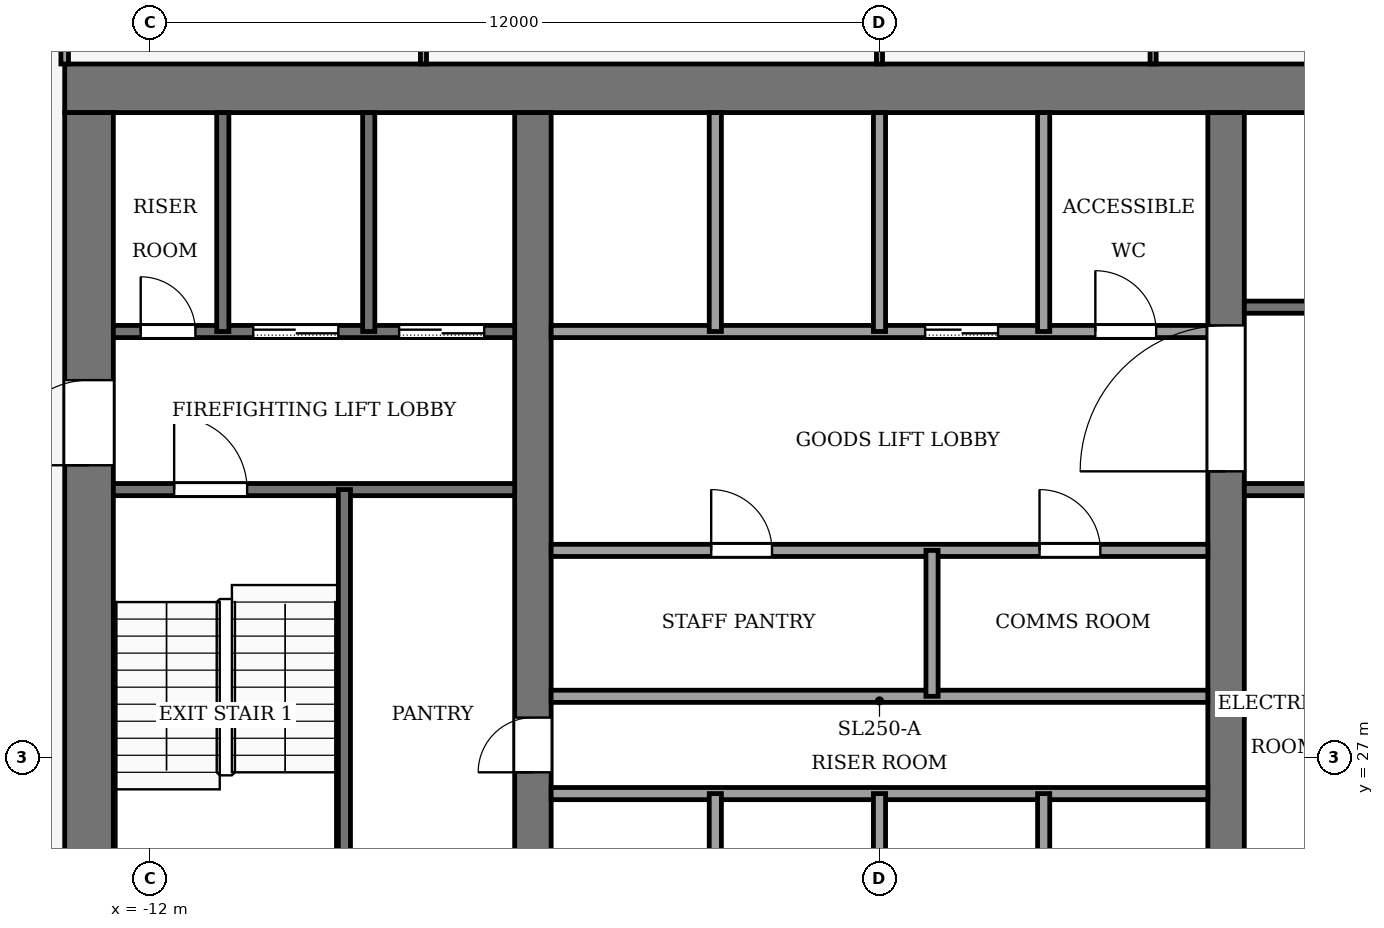
"""IFC4 building model, lengths in metres.
Left out: names, types, materials, properties, quantities, classifications, styles, units other than length and angle.
Written with IfcOpenShell. Run it as: python <this file> out.ifc"""

import sys

from ifc_helpers import new_model, si_unit, direction, frame, frame_2d, origin, place, context, subcontext, project, spatial, rectangle, extrude, element, fill, save


model = new_model("IFC4")
c1 = context("Model", 3, precision=1e-05, world=origin(), true_north=direction((0.0, 1.0)))
c2 = subcontext(c1, "Body", "Model", "MODEL_VIEW")
j1 = project(units=[si_unit("LENGTHUNIT", "METRE"), si_unit("PLANEANGLEUNIT", "RADIAN")], contexts=[c1])
p1 = place(None, origin())
s1 = spatial("IfcSite", under=j1, at=p1, CompositionType="ELEMENT")
p2 = place(p1, origin())
s2 = spatial("IfcBuilding", under=s1, at=p2, CompositionType="ELEMENT")
p3 = place(p2, frame((0.0, 0.0, 266.0)))
s3 = spatial("IfcBuildingStorey", under=s2, at=p3, CompositionType="ELEMENT", Elevation=266.0)
p4 = place(p3, frame((-13.4, 38.0, -0.13), z_axis=(0.0, 0.0, 1.0), x_axis=(1.0, 0.0, 0.0)))
e1 = element("IfcWall", 1, at=p4, inside=s3, PredefinedType="SHEAR", context=c2, shape_type="SweptSolid", body=[
    extrude(rectangle(XDim=26.8, YDim=0.8, at=frame_2d((13.4, 0.0))), origin(), (0.0, 0.0, 1.0), 4.0),
])
p5 = place(p3, frame((-13.0, 18.4, -0.13), z_axis=(0.0, 0.0, 1.0), x_axis=(0.0, 1.0, 0.0)))
e2 = element("IfcWall", 2, at=p5, inside=s3, PredefinedType="SHEAR", context=c2, shape_type="SweptSolid", body=[
    extrude(rectangle(XDim=19.2, YDim=0.8, at=frame_2d((9.6, 0.0))), origin(), (0.0, 0.0, 1.0), 4.0),
])
p6 = place(p5, frame((2.8, 0.0, 0.13)))
e3 = element("IfcOpeningElement", 3, at=p6, cuts=e2, PredefinedType="OPENING", context=c2, shape_type="SweptSolid", body=[
    extrude(rectangle(XDim=2.4, YDim=2.4, at=frame_2d((1.2, 1.2))), frame((0.0, 0.41, 0.0), z_axis=(0.0, -1.0, 0.0), x_axis=(1.0, 0.0, 0.0)), (0.0, 0.0, 1.0), 0.82),
])
p7 = place(p5, frame((13.4, 0.0, 0.13)))
e4 = element("IfcOpeningElement", 4, at=p7, cuts=e2, PredefinedType="OPENING", context=c2, shape_type="SweptSolid", body=[
    extrude(rectangle(XDim=1.4, YDim=2.2, at=frame_2d((0.7, 1.1))), frame((0.0, 0.41, 0.0), z_axis=(0.0, -1.0, 0.0), x_axis=(1.0, 0.0, 0.0)), (0.0, 0.0, 1.0), 0.82),
])
p8 = place(p3, frame((-5.7, 18.4, -0.13), z_axis=(0.0, 0.0, 1.0), x_axis=(0.0, 1.0, 0.0)))
e5 = element("IfcWall", 5, at=p8, inside=s3, PredefinedType="SHEAR", context=c2, shape_type="SweptSolid", body=[
    extrude(rectangle(XDim=19.2, YDim=0.6, at=frame_2d((9.6, 0.0))), origin(), (0.0, 0.0, 1.0), 4.0),
])
p9 = place(p8, frame((8.35, 0.0, 0.13)))
e6 = element("IfcOpeningElement", 6, at=p9, cuts=e5, PredefinedType="OPENING", context=c2, shape_type="SweptSolid", body=[
    extrude(rectangle(XDim=0.9, YDim=2.1, at=frame_2d((0.45, 1.05))), frame((0.0, 0.31, 0.0), z_axis=(0.0, -1.0, 0.0), x_axis=(1.0, 0.0, 0.0)), (0.0, 0.0, 1.0), 0.62),
])
p10 = place(p3, frame((5.7, 18.4, -0.13), z_axis=(0.0, 0.0, 1.0), x_axis=(0.0, 1.0, 0.0)))
e7 = element("IfcWall", 7, at=p10, inside=s3, PredefinedType="SHEAR", context=c2, shape_type="SweptSolid", body=[
    extrude(rectangle(XDim=19.2, YDim=0.6, at=frame_2d((9.6, 0.0))), origin(), (0.0, 0.0, 1.0), 4.0),
])
p11 = place(p10, frame((13.3, 0.0, 0.13)))
e8 = element("IfcOpeningElement", 8, at=p11, cuts=e7, PredefinedType="OPENING", context=c2, shape_type="SweptSolid", body=[
    extrude(rectangle(XDim=2.4, YDim=2.4, at=frame_2d((1.2, 1.2))), frame((0.0, 0.31, 0.0), z_axis=(0.0, -1.0, 0.0), x_axis=(1.0, 0.0, 0.0)), (0.0, 0.0, 1.0), 0.62),
])
for number, where, z_axis, x_axis in (
    (9, (-5.4, 26.4, 0.0), (0.0, 0.0, 1.0), (1.0, 0.0, 0.0)),
    (10, (-5.4, 28.0, 0.0), (0.0, 0.0, 1.0), (1.0, 0.0, 0.0)),
):
    element("IfcWall", number, at=place(p3, frame(where, z_axis=z_axis, x_axis=x_axis)), inside=s3, PredefinedType="PARTITIONING", context=c2, shape_type="SweptSolid", body=[
        extrude(rectangle(XDim=10.8, YDim=0.2, at=frame_2d((5.4, 0.0))), origin(), (0.0, 0.0, 1.0), 3.87),
    ])
p12 = place(p3, frame((-5.4, 30.4, 0.0), z_axis=(0.0, 0.0, 1.0), x_axis=(1.0, 0.0, 0.0)))
e11 = element("IfcWall", 11, at=p12, inside=s3, PredefinedType="PARTITIONING", context=c2, shape_type="SweptSolid", body=[
    extrude(rectangle(XDim=10.8, YDim=0.2, at=frame_2d((5.4, 0.0))), origin(), (0.0, 0.0, 1.0), 3.87),
])
p13 = place(p12, frame((2.632, 0.0, 0.0)))
e12 = element("IfcOpeningElement", 12, at=p13, cuts=e11, PredefinedType="OPENING", context=c2, shape_type="SweptSolid", body=[
    extrude(rectangle(XDim=1.0, YDim=2.1, at=frame_2d((0.5, 1.05))), frame((0.0, 0.11, 0.0), z_axis=(0.0, -1.0, 0.0), x_axis=(1.0, 0.0, 0.0)), (0.0, 0.0, 1.0), 0.22),
])
p14 = place(p12, frame((8.032, 0.0, 0.0)))
e13 = element("IfcOpeningElement", 13, at=p14, cuts=e11, PredefinedType="OPENING", context=c2, shape_type="SweptSolid", body=[
    extrude(rectangle(XDim=1.0, YDim=2.1, at=frame_2d((0.5, 1.05))), frame((0.0, 0.11, 0.0), z_axis=(0.0, -1.0, 0.0), x_axis=(1.0, 0.0, 0.0)), (0.0, 0.0, 1.0), 0.22),
])
p15 = place(p3, frame((-12.6, 31.4, 0.0), z_axis=(0.0, 0.0, 1.0), x_axis=(1.0, 0.0, 0.0)))
e14 = element("IfcWall", 14, at=p15, inside=s3, PredefinedType="PARTITIONING", context=c2, shape_type="SweptSolid", body=[
    extrude(rectangle(XDim=6.6, YDim=0.2, at=frame_2d((3.3, 0.0))), origin(), (0.0, 0.0, 1.0), 3.87),
])
p16 = place(p15, frame((1.0, 0.0, 0.0)))
e15 = element("IfcOpeningElement", 15, at=p16, cuts=e14, PredefinedType="OPENING", context=c2, shape_type="SweptSolid", body=[
    extrude(rectangle(XDim=1.2, YDim=2.2, at=frame_2d((0.6, 1.1))), frame((0.0, 0.11, 0.0), z_axis=(0.0, -1.0, 0.0), x_axis=(1.0, 0.0, 0.0)), (0.0, 0.0, 1.0), 0.22),
])
p17 = place(p3, frame((6.0, 31.4, 0.0), z_axis=(0.0, 0.0, 1.0), x_axis=(1.0, 0.0, 0.0)))
e16 = element("IfcWall", 16, at=p17, inside=s3, PredefinedType="PARTITIONING", context=c2, shape_type="SweptSolid", body=[
    extrude(rectangle(XDim=6.6, YDim=0.2, at=frame_2d((3.3, 0.0))), origin(), (0.0, 0.0, 1.0), 3.87),
])
p18 = place(p3, frame((-12.6, 34.0, 0.0), z_axis=(0.0, 0.0, 1.0), x_axis=(1.0, 0.0, 0.0)))
e17 = element("IfcWall", 17, at=p18, inside=s3, PredefinedType="PARTITIONING", context=c2, shape_type="SweptSolid", body=[
    extrude(rectangle(XDim=6.6, YDim=0.2, at=frame_2d((3.3, 0.0))), origin(), (0.0, 0.0, 1.0), 3.87),
])
p19 = place(p18, frame((4.7, 0.0, 0.0)))
e18 = element("IfcOpeningElement", 18, at=p19, cuts=e17, PredefinedType="OPENING", context=c2, shape_type="SweptSolid", body=[
    extrude(rectangle(XDim=1.4, YDim=2.2, at=frame_2d((0.7, 1.1))), frame((0.0, 0.11, 0.0), z_axis=(0.0, -1.0, 0.0), x_axis=(1.0, 0.0, 0.0)), (0.0, 0.0, 1.0), 0.22),
])
p20 = place(p18, frame((2.3, 0.0, 0.0)))
e19 = element("IfcOpeningElement", 19, at=p20, cuts=e17, PredefinedType="OPENING", context=c2, shape_type="SweptSolid", body=[
    extrude(rectangle(XDim=1.4, YDim=2.2, at=frame_2d((0.7, 1.1))), frame((0.0, 0.11, 0.0), z_axis=(0.0, -1.0, 0.0), x_axis=(1.0, 0.0, 0.0)), (0.0, 0.0, 1.0), 0.22),
])
p21 = place(p18, frame((0.45, 0.0, 0.0)))
e20 = element("IfcOpeningElement", 20, at=p21, cuts=e17, PredefinedType="OPENING", context=c2, shape_type="SweptSolid", body=[
    extrude(rectangle(XDim=0.9, YDim=2.1, at=frame_2d((0.45, 1.05))), frame((0.0, 0.11, 0.0), z_axis=(0.0, -1.0, 0.0), x_axis=(1.0, 0.0, 0.0)), (0.0, 0.0, 1.0), 0.22),
])
p22 = place(p3, frame((-5.4, 34.0, 0.0), z_axis=(0.0, 0.0, 1.0), x_axis=(1.0, 0.0, 0.0)))
e21 = element("IfcWall", 21, at=p22, inside=s3, PredefinedType="PARTITIONING", context=c2, shape_type="SweptSolid", body=[
    extrude(rectangle(XDim=10.8, YDim=0.2, at=frame_2d((5.4, 0.0))), origin(), (0.0, 0.0, 1.0), 3.87),
])
p23 = place(p22, frame((6.15, 0.0, 0.0)))
e22 = element("IfcOpeningElement", 22, at=p23, cuts=e21, PredefinedType="OPENING", context=c2, shape_type="SweptSolid", body=[
    extrude(rectangle(XDim=1.2, YDim=2.2, at=frame_2d((0.6, 1.1))), frame((0.0, 0.11, 0.0), z_axis=(0.0, -1.0, 0.0), x_axis=(1.0, 0.0, 0.0)), (0.0, 0.0, 1.0), 0.22),
])
p24 = place(p22, frame((8.95, 0.0, 0.0)))
e23 = element("IfcOpeningElement", 23, at=p24, cuts=e21, PredefinedType="OPENING", context=c2, shape_type="SweptSolid", body=[
    extrude(rectangle(XDim=1.0, YDim=2.1, at=frame_2d((0.5, 1.05))), frame((0.0, 0.11, 0.0), z_axis=(0.0, -1.0, 0.0), x_axis=(1.0, 0.0, 0.0)), (0.0, 0.0, 1.0), 0.22),
])
p25 = place(p3, frame((6.0, 34.4, 0.0), z_axis=(0.0, 0.0, 1.0), x_axis=(1.0, 0.0, 0.0)))
e24 = element("IfcWall", 24, at=p25, inside=s3, PredefinedType="PARTITIONING", context=c2, shape_type="SweptSolid", body=[
    extrude(rectangle(XDim=6.6, YDim=0.2, at=frame_2d((3.3, 0.0))), origin(), (0.0, 0.0, 1.0), 3.87),
])
p26 = place(p25, frame((4.8, 0.0, 0.0)))
e25 = element("IfcOpeningElement", 25, at=p26, cuts=e24, PredefinedType="OPENING", context=c2, shape_type="SweptSolid", body=[
    extrude(rectangle(XDim=1.2, YDim=2.2, at=frame_2d((0.6, 1.1))), frame((0.0, 0.11, 0.0), z_axis=(0.0, -1.0, 0.0), x_axis=(1.0, 0.0, 0.0)), (0.0, 0.0, 1.0), 0.22),
])
p27 = place(p3, frame((-10.8, 34.0, 0.0), z_axis=(0.0, 0.0, 1.0), x_axis=(0.0, 1.0, 0.0)))
e26 = element("IfcWall", 26, at=p27, inside=s3, PredefinedType="PARTITIONING", context=c2, shape_type="SweptSolid", body=[
    extrude(rectangle(XDim=3.6, YDim=0.2, at=frame_2d((1.8, 0.0))), origin(), (0.0, 0.0, 1.0), 3.87),
])
p28 = place(p3, frame((-8.8, 24.0, 0.0), z_axis=(0.0, 0.0, 1.0), x_axis=(0.0, 1.0, 0.0)))
e27 = element("IfcWall", 27, at=p28, inside=s3, PredefinedType="PARTITIONING", context=c2, shape_type="SweptSolid", body=[
    extrude(rectangle(XDim=7.4, YDim=0.2, at=frame_2d((3.7, 0.0))), origin(), (0.0, 0.0, 1.0), 3.87),
])
p29 = place(p3, frame((-8.4, 34.0, 0.0), z_axis=(0.0, 0.0, 1.0), x_axis=(0.0, 1.0, 0.0)))
e28 = element("IfcWall", 28, at=p29, inside=s3, PredefinedType="PARTITIONING", context=c2, shape_type="SweptSolid", body=[
    extrude(rectangle(XDim=3.6, YDim=0.2, at=frame_2d((1.8, 0.0))), origin(), (0.0, 0.0, 1.0), 3.87),
])
p30 = place(p3, frame((-2.7, 24.0, 0.0), z_axis=(0.0, 0.0, 1.0), x_axis=(0.0, 1.0, 0.0)))
e29 = element("IfcWall", 29, at=p30, inside=s3, PredefinedType="PARTITIONING", context=c2, shape_type="SweptSolid", body=[
    extrude(rectangle(XDim=2.4, YDim=0.2, at=frame_2d((1.2, 0.0))), origin(), (0.0, 0.0, 1.0), 3.87),
])
p31 = place(p3, frame((-2.7, 34.0, 0.0), z_axis=(0.0, 0.0, 1.0), x_axis=(0.0, 1.0, 0.0)))
e30 = element("IfcWall", 30, at=p31, inside=s3, PredefinedType="PARTITIONING", context=c2, shape_type="SweptSolid", body=[
    extrude(rectangle(XDim=3.6, YDim=0.2, at=frame_2d((1.8, 0.0))), origin(), (0.0, 0.0, 1.0), 3.87),
])
p32 = place(p3, frame((0.0, 24.0, 0.0), z_axis=(0.0, 0.0, 1.0), x_axis=(0.0, 1.0, 0.0)))
e31 = element("IfcWall", 31, at=p32, inside=s3, PredefinedType="PARTITIONING", context=c2, shape_type="SweptSolid", body=[
    extrude(rectangle(XDim=2.4, YDim=0.2, at=frame_2d((1.2, 0.0))), origin(), (0.0, 0.0, 1.0), 3.87),
])
p33 = place(p3, frame((0.0, 34.0, 0.0), z_axis=(0.0, 0.0, 1.0), x_axis=(0.0, 1.0, 0.0)))
e32 = element("IfcWall", 32, at=p33, inside=s3, PredefinedType="PARTITIONING", context=c2, shape_type="SweptSolid", body=[
    extrude(rectangle(XDim=3.6, YDim=0.2, at=frame_2d((1.8, 0.0))), origin(), (0.0, 0.0, 1.0), 3.87),
])
for number, where, z_axis, x_axis in (
    (33, (0.864, 28.0, 0.0), (0.0, 0.0, 1.0), (0.0, 1.0, 0.0)),
    (34, (2.7, 24.0, 0.0), (0.0, 0.0, 1.0), (0.0, 1.0, 0.0)),
):
    element("IfcWall", number, at=place(p3, frame(where, z_axis=z_axis, x_axis=x_axis)), inside=s3, PredefinedType="PARTITIONING", context=c2, shape_type="SweptSolid", body=[
        extrude(rectangle(XDim=2.4, YDim=0.2, at=frame_2d((1.2, 0.0))), origin(), (0.0, 0.0, 1.0), 3.87),
    ])
p34 = place(p3, frame((2.7, 34.0, 0.0), z_axis=(0.0, 0.0, 1.0), x_axis=(0.0, 1.0, 0.0)))
e35 = element("IfcWall", 35, at=p34, inside=s3, PredefinedType="PARTITIONING", context=c2, shape_type="SweptSolid", body=[
    extrude(rectangle(XDim=3.6, YDim=0.2, at=frame_2d((1.8, 0.0))), origin(), (0.0, 0.0, 1.0), 3.87),
])
p35 = place(p3, frame((-13.4, 40.5, 0.0), z_axis=(0.0, 0.0, 1.0), x_axis=(0.0, -1.0, 0.0)))
e36 = element("IfcWall", 36, at=p35, inside=s3, PredefinedType="PARTITIONING", context=c2, shape_type="SweptSolid", body=[
    extrude(rectangle(XDim=2.1, YDim=0.125, at=frame_2d((1.05, 0.0))), origin(), (0.0, 0.0, 1.0), 3.14),
])
p36 = place(p35, frame((0.55, 0.0, 0.0)))
e37 = element("IfcOpeningElement", 37, at=p36, cuts=e36, PredefinedType="OPENING", context=c2, shape_type="SweptSolid", body=[
    extrude(rectangle(XDim=1.0, YDim=2.1, at=frame_2d((0.5, 1.05))), frame((0.0, 0.073, 0.0), z_axis=(0.0, -1.0, 0.0), x_axis=(1.0, 0.0, 0.0)), (0.0, 0.0, 1.0), 0.145),
])
p37 = place(p3, frame((-7.5, 38.4, 0.0), z_axis=(0.0, 0.0, 1.0), x_axis=(0.0, 1.0, 0.0)))
e38 = element("IfcWall", 38, at=p37, inside=s3, PredefinedType="PARTITIONING", context=c2, shape_type="SweptSolid", body=[
    extrude(rectangle(XDim=2.104, YDim=0.1, at=frame_2d((1.052, 0.0))), origin(), (0.0, 0.0, 1.0), 3.87),
])
p38 = place(p3, frame((0.0, 38.4, 0.0), z_axis=(0.0, 0.0, 1.0), x_axis=(0.0, 1.0, 0.0)))
e39 = element("IfcWall", 39, at=p38, inside=s3, PredefinedType="PARTITIONING", context=c2, shape_type="SweptSolid", body=[
    extrude(rectangle(XDim=2.1, YDim=0.1, at=frame_2d((1.05, 0.0))), origin(), (0.0, 0.0, 1.0), 3.44),
])
p39 = place(p3, frame((4.5, 38.4, 0.0), z_axis=(0.0, 0.0, 1.0), x_axis=(0.0, 1.0, 0.0)))
e40 = element("IfcWall", 40, at=p39, inside=s3, PredefinedType="PARTITIONING", context=c2, shape_type="SweptSolid", body=[
    extrude(rectangle(XDim=2.1, YDim=0.1, at=frame_2d((1.05, 0.0))), origin(), (0.0, 0.0, 1.0), 3.87),
])
p40 = place(p39, frame((0.55, 0.0, 0.0)))
e41 = element("IfcOpeningElement", 41, at=p40, cuts=e40, PredefinedType="OPENING", context=c2, shape_type="SweptSolid", body=[
    extrude(rectangle(XDim=1.0, YDim=2.1, at=frame_2d((0.5, 1.05))), frame((0.0, 0.06, 0.0), z_axis=(0.0, -1.0, 0.0), x_axis=(1.0, 0.0, 0.0)), (0.0, 0.0, 1.0), 0.12),
])
p41 = place(p23, origin())
e42 = element("IfcDoor", 42, at=p41, inside=s3, OperationType="SLIDING_TO_LEFT", PredefinedType="DOOR", context=c2, shape_type="SweptSolid", body=[
    extrude(rectangle(XDim=1.2, YDim=2.2, at=frame_2d((0.6, 1.1))), frame((0.0, 0.025, 0.0), z_axis=(0.0, -1.0, 0.0), x_axis=(1.0, 0.0, 0.0)), (0.0, 0.0, 1.0), 0.05),
])
fill(e22, e42)
p42 = place(p19, origin())
e43 = element("IfcDoor", 43, at=p42, inside=s3, OperationType="SLIDING_TO_LEFT", PredefinedType="DOOR", context=c2, shape_type="SweptSolid", body=[
    extrude(rectangle(XDim=1.4, YDim=2.2, at=frame_2d((0.7, 1.1))), frame((0.0, 0.025, 0.0), z_axis=(0.0, -1.0, 0.0), x_axis=(1.0, 0.0, 0.0)), (0.0, 0.0, 1.0), 0.05),
])
fill(e18, e43)
p43 = place(p20, origin())
e44 = element("IfcDoor", 44, at=p43, inside=s3, OperationType="SLIDING_TO_LEFT", PredefinedType="DOOR", context=c2, shape_type="SweptSolid", body=[
    extrude(rectangle(XDim=1.4, YDim=2.2, at=frame_2d((0.7, 1.1))), frame((0.0, 0.025, 0.0), z_axis=(0.0, -1.0, 0.0), x_axis=(1.0, 0.0, 0.0)), (0.0, 0.0, 1.0), 0.05),
])
fill(e19, e44)
p44 = place(p21, origin())
e45 = element("IfcDoor", 45, at=p44, inside=s3, OperationType="SINGLE_SWING_RIGHT", PredefinedType="DOOR", context=c2, shape_type="SweptSolid", body=[
    extrude(rectangle(XDim=0.9, YDim=2.1, at=frame_2d((0.45, 1.05))), frame((0.0, 0.025, 0.0), z_axis=(0.0, -1.0, 0.0), x_axis=(1.0, 0.0, 0.0)), (0.0, 0.0, 1.0), 0.05),
])
fill(e20, e45)
p45 = place(p13, origin())
e46 = element("IfcDoor", 46, at=p45, inside=s3, OperationType="SINGLE_SWING_LEFT", PredefinedType="DOOR", context=c2, shape_type="SweptSolid", body=[
    extrude(rectangle(XDim=1.0, YDim=2.1, at=frame_2d((0.5, 1.05))), frame((0.0, 0.025, 0.0), z_axis=(0.0, -1.0, 0.0), x_axis=(1.0, 0.0, 0.0)), (0.0, 0.0, 1.0), 0.05),
])
fill(e12, e46)
p46 = place(p14, origin())
e47 = element("IfcDoor", 47, at=p46, inside=s3, OperationType="SINGLE_SWING_RIGHT", PredefinedType="DOOR", context=c2, shape_type="SweptSolid", body=[
    extrude(rectangle(XDim=1.0, YDim=2.1, at=frame_2d((0.5, 1.05))), frame((0.0, 0.025, 0.0), z_axis=(0.0, -1.0, 0.0), x_axis=(1.0, 0.0, 0.0)), (0.0, 0.0, 1.0), 0.05),
])
fill(e13, e47)
p47 = place(p24, origin())
e48 = element("IfcDoor", 48, at=p47, inside=s3, OperationType="SINGLE_SWING_LEFT", PredefinedType="DOOR", context=c2, shape_type="SweptSolid", body=[
    extrude(rectangle(XDim=1.0, YDim=2.1, at=frame_2d((0.5, 1.05))), frame((0.0, 0.025, 0.0), z_axis=(0.0, -1.0, 0.0), x_axis=(1.0, 0.0, 0.0)), (0.0, 0.0, 1.0), 0.05),
])
fill(e23, e48)
p48 = place(p9, origin())
e49 = element("IfcDoor", 49, at=p48, inside=s3, OperationType="SINGLE_SWING_RIGHT", PredefinedType="DOOR", context=c2, shape_type="SweptSolid", body=[
    extrude(rectangle(XDim=0.9, YDim=2.1, at=frame_2d((0.45, 1.05))), frame((0.0, 0.025, 0.0), z_axis=(0.0, -1.0, 0.0), x_axis=(1.0, 0.0, 0.0)), (0.0, 0.0, 1.0), 0.05),
])
fill(e6, e49)
p49 = place(p16, origin())
e50 = element("IfcDoor", 50, at=p49, inside=s3, OperationType="SINGLE_SWING_RIGHT", PredefinedType="DOOR", context=c2, shape_type="SweptSolid", body=[
    extrude(rectangle(XDim=1.2, YDim=2.2, at=frame_2d((0.6, 1.1))), frame((0.0, 0.025, 0.0), z_axis=(0.0, -1.0, 0.0), x_axis=(1.0, 0.0, 0.0)), (0.0, 0.0, 1.0), 0.05),
])
fill(e15, e50)
p50 = place(p11, origin())
e51 = element("IfcDoor", 51, at=p50, inside=s3, OperationType="DOUBLE_DOOR_SINGLE_SWING", PredefinedType="DOOR", context=c2, shape_type="SweptSolid", body=[
    extrude(rectangle(XDim=2.4, YDim=2.4, at=frame_2d((1.2, 1.2))), frame((0.0, 0.025, 0.0), z_axis=(0.0, -1.0, 0.0), x_axis=(1.0, 0.0, 0.0)), (0.0, 0.0, 1.0), 0.05),
])
fill(e8, e51)
p51 = place(p7, origin())
e52 = element("IfcDoor", 52, at=p51, inside=s3, OperationType="SINGLE_SWING_RIGHT", PredefinedType="DOOR", context=c2, shape_type="SweptSolid", body=[
    extrude(rectangle(XDim=1.4, YDim=2.2, at=frame_2d((0.7, 1.1))), frame((0.0, 0.025, 0.0), z_axis=(0.0, -1.0, 0.0), x_axis=(1.0, 0.0, 0.0)), (0.0, 0.0, 1.0), 0.05),
])
fill(e4, e52)
save(model, sys.argv[1])
